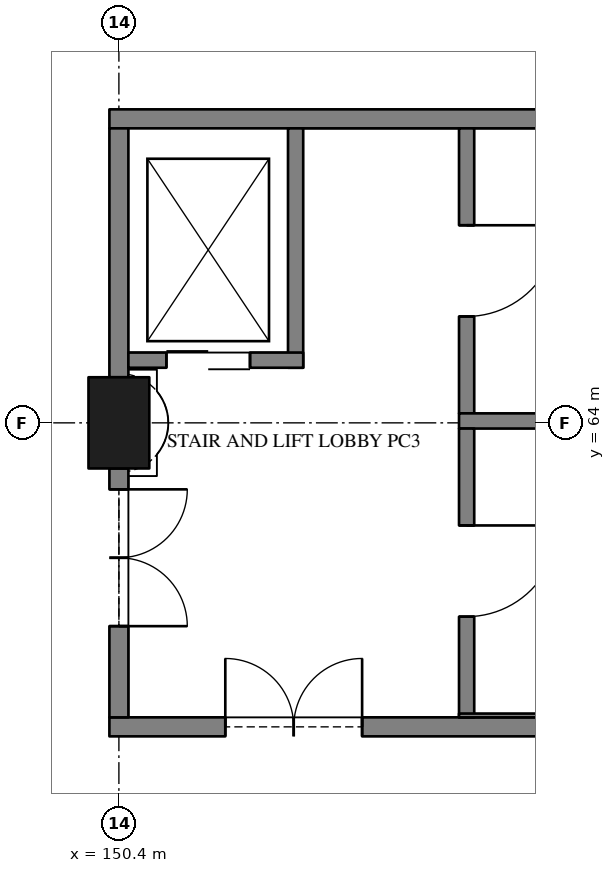
"""IFC4 building model, lengths in metres.
Left out: names, types, materials, properties, quantities, classifications, styles, units other than length and angle.
Written with IfcOpenShell. Run it as: python <this file> out.ifc"""

import sys

from ifc_helpers import new_model, si_unit, direction, frame, frame_2d, origin, origin_2d, place, context, subcontext, project, spatial, rectangle, extrude, element, fill, save


model = new_model("IFC4")
c1 = context("Model", 3, precision=1e-05, world=origin(), true_north=direction((0.0, 1.0)))
c2 = subcontext(c1, "Body", "Model", "MODEL_VIEW")
j1 = project(units=[si_unit("LENGTHUNIT", "METRE"), si_unit("PLANEANGLEUNIT", "RADIAN")], contexts=[c1])
p1 = place(None, origin())
s1 = spatial("IfcSite", under=j1, at=p1, CompositionType="ELEMENT")
p2 = place(p1, origin())
s2 = spatial("IfcBuilding", under=s1, at=p2, CompositionType="ELEMENT")
p3 = place(p2, frame((0.0, 0.0, -5.4)))
s3 = spatial("IfcBuildingStorey", under=s2, at=p3, CompositionType="ELEMENT", Elevation=-5.4)
p4 = place(p3, frame((150.4, 64.0, 0.0), z_axis=(0.0, 0.0, 1.0), x_axis=(1.0, 0.0, 0.0)))
e1 = element("IfcColumn", 1, at=p4, inside=s3, PredefinedType="COLUMN", context=c2, shape_type="SweptSolid", body=[
    extrude(rectangle(XDim=0.8, YDim=1.2, at=origin_2d()), origin(), (0.0, 0.0, 1.0), 5.4),
])
p5 = place(p3, frame((150.275, 60.0, 0.0), z_axis=(0.0, 0.0, 1.0), x_axis=(1.0, 0.0, 0.0)))
e2 = element("IfcWall", 2, at=p5, inside=s3, PredefinedType="SOLIDWALL", context=c2, shape_type="SweptSolid", body=[
    extrude(rectangle(XDim=11.05, YDim=0.25, at=frame_2d((5.525, 0.0))), origin(), (0.0, 0.0, 1.0), 4.8),
])
p6 = place(p5, frame((1.525, 0.0, 0.0)))
e3 = element("IfcOpeningElement", 3, at=p6, cuts=e2, PredefinedType="OPENING", context=c2, shape_type="SweptSolid", body=[
    extrude(rectangle(XDim=1.8, YDim=2.1, at=frame_2d((0.9, 1.05))), frame((0.0, 0.135, 0.0), z_axis=(0.0, -1.0, 0.0), x_axis=(1.0, 0.0, 0.0)), (0.0, 0.0, 1.0), 0.27),
])
p7 = place(p3, frame((161.325, 68.0, 0.0), z_axis=(0.0, 0.0, 1.0), x_axis=(-1.0, 0.0, 0.0)))
e4 = element("IfcWall", 4, at=p7, inside=s3, PredefinedType="SOLIDWALL", context=c2, shape_type="SweptSolid", body=[
    extrude(rectangle(XDim=11.05, YDim=0.25, at=frame_2d((5.525, 0.0))), origin(), (0.0, 0.0, 1.0), 4.8),
])
p8 = place(p3, frame((150.4, 67.875, 0.0), z_axis=(0.0, 0.0, 1.0), x_axis=(0.0, -1.0, 0.0)))
e5 = element("IfcWall", 5, at=p8, inside=s3, PredefinedType="SOLIDWALL", context=c2, shape_type="SweptSolid", body=[
    extrude(rectangle(XDim=3.275, YDim=0.25, at=frame_2d((1.637, 0.0))), origin(), (0.0, 0.0, 1.0), 4.8),
])
p9 = place(p3, frame((150.4, 63.4, 0.0), z_axis=(0.0, 0.0, 1.0), x_axis=(0.0, -1.0, 0.0)))
e6 = element("IfcWall", 6, at=p9, inside=s3, PredefinedType="SOLIDWALL", context=c2, shape_type="SweptSolid", body=[
    extrude(rectangle(XDim=3.275, YDim=0.25, at=frame_2d((1.637, 0.0))), origin(), (0.0, 0.0, 1.0), 4.8),
])
p10 = place(p9, frame((0.275, 0.0, 0.0)))
e7 = element("IfcOpeningElement", 7, at=p10, cuts=e6, PredefinedType="OPENING", context=c2, shape_type="SweptSolid", body=[
    extrude(rectangle(XDim=1.8, YDim=2.1, at=frame_2d((0.9, 1.05))), frame((0.0, 0.135, 0.0), z_axis=(0.0, -1.0, 0.0), x_axis=(1.0, 0.0, 0.0)), (0.0, 0.0, 1.0), 0.27),
])
p11 = place(p3, frame((154.975, 67.875, 0.0), z_axis=(0.0, 0.0, 1.0), x_axis=(0.0, -1.0, 0.0)))
e8 = element("IfcWall", 8, at=p11, inside=s3, PredefinedType="SOLIDWALL", context=c2, shape_type="SweptSolid", body=[
    extrude(rectangle(XDim=3.75, YDim=0.2, at=frame_2d((1.875, 0.0))), origin(), (0.0, 0.0, 1.0), 3.6),
])
p12 = place(p11, frame((1.275, 0.0, 0.0)))
e9 = element("IfcOpeningElement", 9, at=p12, cuts=e8, PredefinedType="OPENING", context=c2, shape_type="SweptSolid", body=[
    extrude(rectangle(XDim=1.2, YDim=2.1, at=frame_2d((0.6, 1.05))), frame((0.0, 0.11, 0.0), z_axis=(0.0, -1.0, 0.0), x_axis=(1.0, 0.0, 0.0)), (0.0, 0.0, 1.0), 0.22),
])
p13 = place(p3, frame((154.875, 64.025, 0.0), z_axis=(0.0, 0.0, 1.0), x_axis=(1.0, 0.0, 0.0)))
e10 = element("IfcWall", 10, at=p13, inside=s3, PredefinedType="SOLIDWALL", context=c2, shape_type="SweptSolid", body=[
    extrude(rectangle(XDim=6.2, YDim=0.2, at=frame_2d((3.1, 0.0))), origin(), (0.0, 0.0, 1.0), 3.6),
])
p14 = place(p3, frame((154.975, 63.925, 0.0), z_axis=(0.0, 0.0, 1.0), x_axis=(0.0, -1.0, 0.0)))
e11 = element("IfcWall", 11, at=p14, inside=s3, PredefinedType="SOLIDWALL", context=c2, shape_type="SweptSolid", body=[
    extrude(rectangle(XDim=3.8, YDim=0.2, at=frame_2d((1.9, 0.0))), origin(), (0.0, 0.0, 1.0), 3.6),
])
p15 = place(p14, frame((1.275, 0.0, 0.0)))
e12 = element("IfcOpeningElement", 12, at=p15, cuts=e11, PredefinedType="OPENING", context=c2, shape_type="SweptSolid", body=[
    extrude(rectangle(XDim=1.2, YDim=2.1, at=frame_2d((0.6, 1.05))), frame((0.0, 0.11, 0.0), z_axis=(0.0, -1.0, 0.0), x_axis=(1.0, 0.0, 0.0)), (0.0, 0.0, 1.0), 0.22),
])
p16 = place(p3, frame((152.725, 67.875, 0.0), z_axis=(0.0, 0.0, 1.0), x_axis=(0.0, -1.0, 0.0)))
e13 = element("IfcWall", 13, at=p16, inside=s3, PredefinedType="SOLIDWALL", context=c2, shape_type="SweptSolid", body=[
    extrude(rectangle(XDim=3.15, YDim=0.2, at=frame_2d((1.575, 0.0))), origin(), (0.0, 0.0, 1.0), 4.8),
])
p17 = place(p3, frame((150.525, 64.825, 0.0), z_axis=(0.0, 0.0, 1.0), x_axis=(1.0, 0.0, 0.0)))
e14 = element("IfcWall", 14, at=p17, inside=s3, PredefinedType="SOLIDWALL", context=c2, shape_type="SweptSolid", body=[
    extrude(rectangle(XDim=2.3, YDim=0.2, at=frame_2d((1.15, 0.0))), origin(), (0.0, 0.0, 1.0), 3.6),
])
p18 = place(p17, frame((0.5, 0.0, 0.0)))
e15 = element("IfcOpeningElement", 15, at=p18, cuts=e14, PredefinedType="OPENING", context=c2, shape_type="SweptSolid", body=[
    extrude(rectangle(XDim=1.1, YDim=2.1, at=frame_2d((0.55, 1.05))), frame((0.0, 0.11, 0.0), z_axis=(0.0, -1.0, 0.0), x_axis=(1.0, 0.0, 0.0)), (0.0, 0.0, 1.0), 0.22),
])
p19 = place(p3, frame((154.875, 60.15, 0.0), z_axis=(0.0, 0.0, 1.0), x_axis=(1.0, 0.0, 0.0)))
e16 = element("IfcWall", 16, at=p19, inside=s3, PredefinedType="SOLIDWALL", context=c2, shape_type="SweptSolid", body=[
    extrude(rectangle(XDim=6.2, YDim=0.05, at=frame_2d((3.1, 0.0))), origin(), (0.0, 0.0, 1.0), 3.6),
])
p20 = place(p18, frame((1.1, 0.0, 0.0), z_axis=(0.0, 0.0, 1.0), x_axis=(-1.0, 0.0, 0.0)))
e17 = element("IfcDoor", 17, at=p20, inside=s3, OperationType="DOUBLE_DOOR_SLIDING", PredefinedType="DOOR", context=c2, shape_type="SweptSolid", body=[
    extrude(rectangle(XDim=1.1, YDim=2.1, at=frame_2d((0.55, 1.05))), frame((0.0, 0.025, 0.0), z_axis=(0.0, -1.0, 0.0), x_axis=(1.0, 0.0, 0.0)), (0.0, 0.0, 1.0), 0.05),
])
fill(e15, e17)
p21 = place(p12, frame((1.2, 0.0, 0.0), z_axis=(0.0, 0.0, 1.0), x_axis=(-1.0, 0.0, 0.0)))
e18 = element("IfcDoor", 18, at=p21, inside=s3, OperationType="SINGLE_SWING_RIGHT", PredefinedType="DOOR", context=c2, shape_type="SweptSolid", body=[
    extrude(rectangle(XDim=1.2, YDim=2.1, at=frame_2d((0.6, 1.05))), frame((0.0, 0.025, 0.0), z_axis=(0.0, -1.0, 0.0), x_axis=(1.0, 0.0, 0.0)), (0.0, 0.0, 1.0), 0.05),
])
fill(e9, e18)
p22 = place(p15, frame((1.2, 0.0, 0.0), z_axis=(0.0, 0.0, 1.0), x_axis=(-1.0, 0.0, 0.0)))
e19 = element("IfcDoor", 19, at=p22, inside=s3, OperationType="SINGLE_SWING_RIGHT", PredefinedType="DOOR", context=c2, shape_type="SweptSolid", body=[
    extrude(rectangle(XDim=1.2, YDim=2.1, at=frame_2d((0.6, 1.05))), frame((0.0, 0.025, 0.0), z_axis=(0.0, -1.0, 0.0), x_axis=(1.0, 0.0, 0.0)), (0.0, 0.0, 1.0), 0.05),
])
fill(e12, e19)
p23 = place(p10, frame((1.8, 0.0, 0.0), z_axis=(0.0, 0.0, 1.0), x_axis=(-1.0, 0.0, 0.0)))
e20 = element("IfcDoor", 20, at=p23, inside=s3, OperationType="DOUBLE_DOOR_DOUBLE_SWING", PredefinedType="DOOR", context=c2, shape_type="SweptSolid", body=[
    extrude(rectangle(XDim=1.8, YDim=2.1, at=frame_2d((0.9, 1.05))), frame((0.0, 0.025, 0.0), z_axis=(0.0, -1.0, 0.0), x_axis=(1.0, 0.0, 0.0)), (0.0, 0.0, 1.0), 0.05),
])
fill(e7, e20)
p24 = place(p6, frame((1.8, 0.0, 0.0), z_axis=(0.0, 0.0, 1.0), x_axis=(-1.0, 0.0, 0.0)))
e21 = element("IfcDoor", 21, at=p24, inside=s3, OperationType="DOUBLE_DOOR_DOUBLE_SWING", PredefinedType="DOOR", context=c2, shape_type="SweptSolid", body=[
    extrude(rectangle(XDim=1.8, YDim=2.1, at=frame_2d((0.9, 1.05))), frame((0.0, 0.025, 0.0), z_axis=(0.0, -1.0, 0.0), x_axis=(1.0, 0.0, 0.0)), (0.0, 0.0, 1.0), 0.05),
])
fill(e3, e21)
save(model, sys.argv[1])
